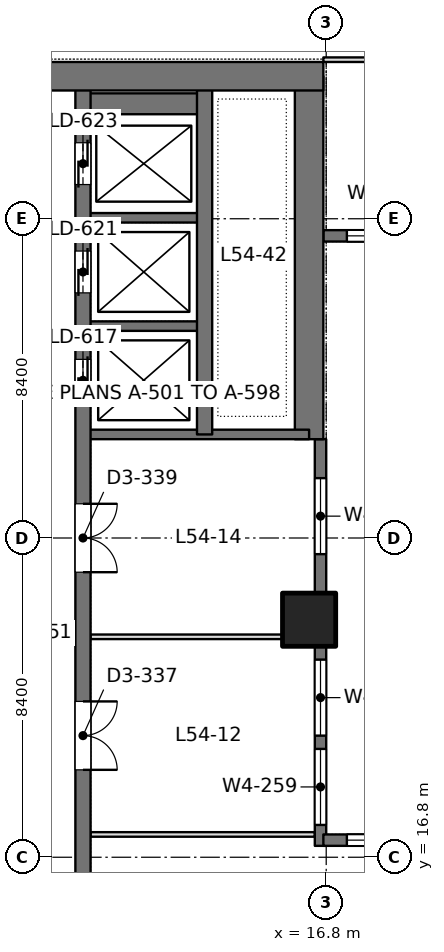
"""IFC4 building model, lengths in metres.
Left out: names, types, materials, properties, quantities, classifications, styles, units other than length and angle.
Written with IfcOpenShell. Run it as: python <this file> out.ifc"""

import sys

from ifc_helpers import new_model, si_unit, direction, frame, frame_2d, origin, origin_2d, place, context, subcontext, project, spatial, rectangle, extrude, element, fill, save


model = new_model("IFC4")
c1 = context("Model", 3, precision=1e-05, world=origin(), true_north=direction((0.0, 1.0)))
c2 = subcontext(c1, "Body", "Model", "MODEL_VIEW")
j1 = project(units=[si_unit("LENGTHUNIT", "METRE"), si_unit("PLANEANGLEUNIT", "RADIAN")], contexts=[c1])
p1 = place(None, origin())
s1 = spatial("IfcSite", under=j1, at=p1, CompositionType="ELEMENT")
p2 = place(p1, origin())
s2 = spatial("IfcBuilding", under=s1, at=p2, CompositionType="ELEMENT")
p3 = place(p2, frame((0.0, 0.0, 236.4)))
s3 = spatial("IfcBuildingStorey", under=s2, at=p3, CompositionType="ELEMENT", Elevation=236.4)
p4 = place(p3, frame((16.35, 23.05, 0.0), z_axis=(0.0, 0.0, 1.0), x_axis=(1.0, 0.0, 0.0)))
e1 = element("IfcColumn", 1, at=p4, inside=s3, PredefinedType="COLUMN", context=c2, shape_type="SweptSolid", body=[
    extrude(rectangle(XDim=1.4, YDim=1.4, at=origin_2d()), origin(), (0.0, 0.0, 1.0), 4.2),
])
p5 = place(p3, frame((-1.125, 37.35, 0.0), z_axis=(0.0, 0.0, 1.0), x_axis=(1.0, 0.0, 0.0)))
e2 = element("IfcWall", 2, at=p5, inside=s3, PredefinedType="SHEAR", context=c2, shape_type="SweptSolid", body=[
    extrude(rectangle(XDim=17.85, YDim=0.75, at=frame_2d((8.925, 0.0))), origin(), (0.0, 0.0, 1.0), 4.2),
])
p6 = place(p5, frame((8.875, 0.0, 0.0)))
e3 = element("IfcOpeningElement", 3, at=p6, cuts=e2, PredefinedType="OPENING", context=c2, shape_type="SweptSolid", body=[
    extrude(rectangle(XDim=1.8, YDim=2.4, at=frame_2d((0.9, 1.2))), frame((0.0, 0.385, 0.0), z_axis=(0.0, -1.0, 0.0), x_axis=(1.0, 0.0, 0.0)), (0.0, 0.0, 1.0), 0.77),
])
p7 = place(p3, frame((16.35, 27.8, 0.0), z_axis=(0.0, 0.0, 1.0), x_axis=(0.0, 1.0, 0.0)))
e4 = element("IfcWall", 4, at=p7, inside=s3, PredefinedType="SHEAR", context=c2, shape_type="SweptSolid", body=[
    extrude(rectangle(XDim=9.55, YDim=0.75, at=frame_2d((4.775, 0.0))), origin(), (0.0, 0.0, 1.0), 4.2),
])
p8 = place(p3, frame((10.4, 13.05, 0.0), z_axis=(0.0, 0.0, 1.0), x_axis=(0.0, 1.0, 0.0)))
e5 = element("IfcWall", 5, at=p8, inside=s3, PredefinedType="SHEAR", context=c2, shape_type="SweptSolid", body=[
    extrude(rectangle(XDim=24.3, YDim=0.4, at=frame_2d((12.15, 0.0))), origin(), (0.0, 0.0, 1.0), 4.2),
])
p9 = place(p8, frame((15.75, 0.0, 0.0)))
e6 = element("IfcOpeningElement", 6, at=p9, cuts=e5, PredefinedType="OPENING", context=c2, shape_type="SweptSolid", body=[
    extrude(rectangle(XDim=1.1, YDim=2.2, at=frame_2d((0.55, 1.1))), frame((0.0, 0.21, 0.0), z_axis=(0.0, -1.0, 0.0), x_axis=(1.0, 0.0, 0.0)), (0.0, 0.0, 1.0), 0.42),
])
p10 = place(p8, frame((18.6, 0.0, 0.0)))
e7 = element("IfcOpeningElement", 7, at=p10, cuts=e5, PredefinedType="OPENING", context=c2, shape_type="SweptSolid", body=[
    extrude(rectangle(XDim=1.1, YDim=2.2, at=frame_2d((0.55, 1.1))), frame((0.0, 0.21, 0.0), z_axis=(0.0, -1.0, 0.0), x_axis=(1.0, 0.0, 0.0)), (0.0, 0.0, 1.0), 0.42),
])
p11 = place(p8, frame((21.45, 0.0, 0.0)))
e8 = element("IfcOpeningElement", 8, at=p11, cuts=e5, PredefinedType="OPENING", context=c2, shape_type="SweptSolid", body=[
    extrude(rectangle(XDim=1.1, YDim=2.2, at=frame_2d((0.55, 1.1))), frame((0.0, 0.21, 0.0), z_axis=(0.0, -1.0, 0.0), x_axis=(1.0, 0.0, 0.0)), (0.0, 0.0, 1.0), 0.42),
])
p12 = place(p8, frame((6.05, 0.0, 0.0)))
e9 = element("IfcOpeningElement", 9, at=p12, cuts=e5, PredefinedType="OPENING", context=c2, shape_type="SweptSolid", body=[
    extrude(rectangle(XDim=1.8, YDim=2.4, at=frame_2d((0.9, 1.2))), frame((0.0, 0.21, 0.0), z_axis=(0.0, -1.0, 0.0), x_axis=(1.0, 0.0, 0.0)), (0.0, 0.0, 1.0), 0.42),
])
p13 = place(p8, frame((11.25, 0.0, 0.0)))
e10 = element("IfcOpeningElement", 10, at=p13, cuts=e5, PredefinedType="OPENING", context=c2, shape_type="SweptSolid", body=[
    extrude(rectangle(XDim=1.8, YDim=2.4, at=frame_2d((0.9, 1.2))), frame((0.0, 0.21, 0.0), z_axis=(0.0, -1.0, 0.0), x_axis=(1.0, 0.0, 0.0)), (0.0, 0.0, 1.0), 0.42),
])
p14 = place(p3, frame((13.6, 27.925, 0.0), z_axis=(0.0, 0.0, 1.0), x_axis=(0.0, 1.0, 0.0)))
e11 = element("IfcWall", 11, at=p14, inside=s3, PredefinedType="SHEAR", context=c2, shape_type="SweptSolid", body=[
    extrude(rectangle(XDim=9.425, YDim=0.4, at=frame_2d((4.712, 0.0))), origin(), (0.0, 0.0, 1.0), 4.2),
])
p15 = place(p3, frame((10.4, 27.925, 0.0), z_axis=(0.0, 0.0, 1.0), x_axis=(1.0, 0.0, 0.0)))
e12 = element("IfcWall", 12, at=p15, inside=s3, PredefinedType="SHEAR", context=c2, shape_type="SweptSolid", body=[
    extrude(rectangle(XDim=5.95, YDim=0.25, at=frame_2d((2.975, 0.0))), origin(), (0.0, 0.0, 1.0), 4.2),
])
for number, where, z_axis, x_axis in (
    (13, (10.4, 30.775, 0.0), (0.0, 0.0, 1.0), (1.0, 0.0, 0.0)),
    (14, (10.4, 33.625, 0.0), (0.0, 0.0, 1.0), (1.0, 0.0, 0.0)),
):
    element("IfcWall", number, at=place(p3, frame(where, z_axis=z_axis, x_axis=x_axis)), inside=s3, PredefinedType="SHEAR", context=c2, shape_type="SweptSolid", body=[
        extrude(rectangle(XDim=3.2, YDim=0.25, at=frame_2d((1.6, 0.0))), origin(), (0.0, 0.0, 1.0), 4.2),
    ])
p16 = place(p3, frame((10.4, 36.625, 0.0), z_axis=(0.0, 0.0, 1.0), x_axis=(1.0, 0.0, 0.0)))
e15 = element("IfcWall", 15, at=p16, inside=s3, PredefinedType="SHEAR", context=c2, shape_type="SweptSolid", body=[
    extrude(rectangle(XDim=3.2, YDim=0.55, at=frame_2d((1.6, 0.0))), origin(), (0.0, 0.0, 1.0), 4.2),
])
p17 = place(p3, frame((16.65, 17.1, 0.0), z_axis=(0.0, 0.0, 1.0), x_axis=(0.0, 1.0, 0.0)))
e16 = element("IfcWall", 16, at=p17, inside=s3, PredefinedType="SOLIDWALL", context=c2, shape_type="SweptSolid", body=[
    extrude(rectangle(XDim=10.7, YDim=0.3, at=frame_2d((5.35, 0.0))), origin(), (0.0, 0.0, 1.0), 4.05),
])
p18 = place(p17, frame((0.55, 0.0, 0.9)))
e17 = element("IfcOpeningElement", 17, at=p18, cuts=e16, PredefinedType="OPENING", context=c2, shape_type="SweptSolid", body=[
    extrude(rectangle(XDim=2.0, YDim=1.9, at=frame_2d((1.0, 0.95))), frame((0.0, 0.16, 0.0), z_axis=(0.0, -1.0, 0.0), x_axis=(1.0, 0.0, 0.0)), (0.0, 0.0, 1.0), 0.32),
])
p19 = place(p17, frame((2.9, 0.0, 0.9)))
e18 = element("IfcOpeningElement", 18, at=p19, cuts=e16, PredefinedType="OPENING", context=c2, shape_type="SweptSolid", body=[
    extrude(rectangle(XDim=2.0, YDim=1.9, at=frame_2d((1.0, 0.95))), frame((0.0, 0.16, 0.0), z_axis=(0.0, -1.0, 0.0), x_axis=(1.0, 0.0, 0.0)), (0.0, 0.0, 1.0), 0.32),
])
p20 = place(p17, frame((7.675, 0.0, 0.9)))
e19 = element("IfcOpeningElement", 19, at=p20, cuts=e16, PredefinedType="OPENING", context=c2, shape_type="SweptSolid", body=[
    extrude(rectangle(XDim=2.0, YDim=1.9, at=frame_2d((1.0, 0.95))), frame((0.0, 0.16, 0.0), z_axis=(0.0, -1.0, 0.0), x_axis=(1.0, 0.0, 0.0)), (0.0, 0.0, 1.0), 0.32),
])
p21 = place(p3, frame((16.725, 17.25, 0.0), z_axis=(0.0, 0.0, 1.0), x_axis=(1.0, 0.0, 0.0)))
e20 = element("IfcWall", 20, at=p21, inside=s3, PredefinedType="SOLIDWALL", context=c2, shape_type="SweptSolid", body=[
    extrude(rectangle(XDim=7.925, YDim=0.3, at=frame_2d((3.962, 0.0))), origin(), (0.0, 0.0, 1.0), 4.05),
])
p22 = place(p21, frame((0.619, 0.0, 0.9)))
e21 = element("IfcOpeningElement", 21, at=p22, cuts=e20, PredefinedType="OPENING", context=c2, shape_type="SweptSolid", body=[
    extrude(rectangle(XDim=2.0, YDim=1.9, at=frame_2d((1.0, 0.95))), frame((0.0, 0.16, 0.0), z_axis=(0.0, -1.0, 0.0), x_axis=(1.0, 0.0, 0.0)), (0.0, 0.0, 1.0), 0.32),
])
p23 = place(p21, frame((3.238, 0.0, 0.9)))
e22 = element("IfcOpeningElement", 22, at=p23, cuts=e20, PredefinedType="OPENING", context=c2, shape_type="SweptSolid", body=[
    extrude(rectangle(XDim=2.0, YDim=1.9, at=frame_2d((1.0, 0.95))), frame((0.0, 0.16, 0.0), z_axis=(0.0, -1.0, 0.0), x_axis=(1.0, 0.0, 0.0)), (0.0, 0.0, 1.0), 0.32),
])
p24 = place(p21, frame((5.856, 0.0, 0.9)))
e23 = element("IfcOpeningElement", 23, at=p24, cuts=e20, PredefinedType="OPENING", context=c2, shape_type="SweptSolid", body=[
    extrude(rectangle(XDim=2.0, YDim=1.9, at=frame_2d((1.0, 0.95))), frame((0.0, 0.16, 0.0), z_axis=(0.0, -1.0, 0.0), x_axis=(1.0, 0.0, 0.0)), (0.0, 0.0, 1.0), 0.32),
])
p25 = place(p3, frame((16.725, 33.15, 0.0), z_axis=(0.0, 0.0, 1.0), x_axis=(1.0, 0.0, 0.0)))
e24 = element("IfcWall", 24, at=p25, inside=s3, PredefinedType="SOLIDWALL", context=c2, shape_type="SweptSolid", body=[
    extrude(rectangle(XDim=7.925, YDim=0.3, at=frame_2d((3.962, 0.0))), origin(), (0.0, 0.0, 1.0), 4.05),
])
p26 = place(p25, frame((0.619, 0.0, 0.9)))
e25 = element("IfcOpeningElement", 25, at=p26, cuts=e24, PredefinedType="OPENING", context=c2, shape_type="SweptSolid", body=[
    extrude(rectangle(XDim=2.0, YDim=1.9, at=frame_2d((1.0, 0.95))), frame((0.0, 0.16, 0.0), z_axis=(0.0, -1.0, 0.0), x_axis=(1.0, 0.0, 0.0)), (0.0, 0.0, 1.0), 0.32),
])
p27 = place(p25, frame((3.238, 0.0, 0.9)))
e26 = element("IfcOpeningElement", 26, at=p27, cuts=e24, PredefinedType="OPENING", context=c2, shape_type="SweptSolid", body=[
    extrude(rectangle(XDim=2.0, YDim=1.9, at=frame_2d((1.0, 0.95))), frame((0.0, 0.16, 0.0), z_axis=(0.0, -1.0, 0.0), x_axis=(1.0, 0.0, 0.0)), (0.0, 0.0, 1.0), 0.32),
])
p28 = place(p25, frame((5.856, 0.0, 0.9)))
e27 = element("IfcOpeningElement", 27, at=p28, cuts=e24, PredefinedType="OPENING", context=c2, shape_type="SweptSolid", body=[
    extrude(rectangle(XDim=2.0, YDim=1.9, at=frame_2d((1.0, 0.95))), frame((0.0, 0.16, 0.0), z_axis=(0.0, -1.0, 0.0), x_axis=(1.0, 0.0, 0.0)), (0.0, 0.0, 1.0), 0.32),
])
p29 = place(p3, frame((10.598, 17.4, 0.0), z_axis=(0.0, 0.0, 1.0), x_axis=(1.0, 0.0, 0.0)))
e28 = element("IfcWall", 28, at=p29, inside=s3, PredefinedType="PARTITIONING", context=c2, shape_type="SweptSolid", body=[
    extrude(rectangle(XDim=5.904, YDim=0.12, at=frame_2d((2.952, 0.0))), origin(), (0.0, 0.0, 1.0), 3.55),
])
p30 = place(p3, frame((10.598, 22.6, 0.0), z_axis=(0.0, 0.0, 1.0), x_axis=(1.0, 0.0, 0.0)))
e29 = element("IfcWall", 29, at=p30, inside=s3, PredefinedType="PARTITIONING", context=c2, shape_type="SweptSolid", body=[
    extrude(rectangle(XDim=5.053, YDim=0.12, at=frame_2d((2.526, 0.0))), origin(), (0.0, 0.0, 1.0), 4.05),
])
p31 = place(p3, frame((16.725, 37.785, 0.0), z_axis=(0.0, 0.0, 1.0), x_axis=(1.0, 0.0, 0.0)))
e30 = element("IfcWall", 30, at=p31, inside=s3, PredefinedType="PARTITIONING", context=c2, shape_type="SweptSolid", body=[
    extrude(rectangle(XDim=16.95, YDim=0.12, at=frame_2d((8.475, 0.0))), origin(), (0.0, 0.0, 1.0), 3.55),
])
p32 = place(p31, frame((7.575, 0.0, 0.0)))
e31 = element("IfcOpeningElement", 31, at=p32, cuts=e30, PredefinedType="OPENING", context=c2, shape_type="SweptSolid", body=[
    extrude(rectangle(XDim=1.8, YDim=2.2, at=frame_2d((0.9, 1.1))), frame((0.0, 0.07, 0.0), z_axis=(0.0, -1.0, 0.0), x_axis=(1.0, 0.0, 0.0)), (0.0, 0.0, 1.0), 0.14),
])
p33 = place(p18, origin())
e32 = element("IfcWindow", 32, at=p33, inside=s3, PartitioningType="SINGLE_PANEL", PredefinedType="WINDOW", context=c2, shape_type="SweptSolid", body=[
    extrude(rectangle(XDim=2.0, YDim=1.9, at=frame_2d((1.0, 0.95))), frame((0.0, 0.03, 0.0), z_axis=(0.0, -1.0, 0.0), x_axis=(1.0, 0.0, 0.0)), (0.0, 0.0, 1.0), 0.06),
])
fill(e17, e32)
p34 = place(p19, origin())
e33 = element("IfcWindow", 33, at=p34, inside=s3, PartitioningType="SINGLE_PANEL", PredefinedType="WINDOW", context=c2, shape_type="SweptSolid", body=[
    extrude(rectangle(XDim=2.0, YDim=1.9, at=frame_2d((1.0, 0.95))), frame((0.0, 0.03, 0.0), z_axis=(0.0, -1.0, 0.0), x_axis=(1.0, 0.0, 0.0)), (0.0, 0.0, 1.0), 0.06),
])
fill(e18, e33)
p35 = place(p20, origin())
e34 = element("IfcWindow", 34, at=p35, inside=s3, PartitioningType="SINGLE_PANEL", PredefinedType="WINDOW", context=c2, shape_type="SweptSolid", body=[
    extrude(rectangle(XDim=2.0, YDim=1.9, at=frame_2d((1.0, 0.95))), frame((0.0, 0.03, 0.0), z_axis=(0.0, -1.0, 0.0), x_axis=(1.0, 0.0, 0.0)), (0.0, 0.0, 1.0), 0.06),
])
fill(e19, e34)
p36 = place(p22, origin())
e35 = element("IfcWindow", 35, at=p36, inside=s3, PartitioningType="SINGLE_PANEL", PredefinedType="WINDOW", context=c2, shape_type="SweptSolid", body=[
    extrude(rectangle(XDim=2.0, YDim=1.9, at=frame_2d((1.0, 0.95))), frame((0.0, 0.03, 0.0), z_axis=(0.0, -1.0, 0.0), x_axis=(1.0, 0.0, 0.0)), (0.0, 0.0, 1.0), 0.06),
])
fill(e21, e35)
p37 = place(p26, origin())
e36 = element("IfcWindow", 36, at=p37, inside=s3, PartitioningType="SINGLE_PANEL", PredefinedType="WINDOW", context=c2, shape_type="SweptSolid", body=[
    extrude(rectangle(XDim=2.0, YDim=1.9, at=frame_2d((1.0, 0.95))), frame((0.0, 0.03, 0.0), z_axis=(0.0, -1.0, 0.0), x_axis=(1.0, 0.0, 0.0)), (0.0, 0.0, 1.0), 0.06),
])
fill(e25, e36)
p38 = place(p9, origin())
e37 = element("IfcDoor", 37, at=p38, inside=s3, OperationType="DOUBLE_DOOR_SLIDING", PredefinedType="DOOR", context=c2, shape_type="SweptSolid", body=[
    extrude(rectangle(XDim=1.1, YDim=2.2, at=frame_2d((0.55, 1.1))), frame((0.0, 0.025, 0.0), z_axis=(0.0, -1.0, 0.0), x_axis=(1.0, 0.0, 0.0)), (0.0, 0.0, 1.0), 0.05),
])
fill(e6, e37)
p39 = place(p10, origin())
e38 = element("IfcDoor", 38, at=p39, inside=s3, OperationType="DOUBLE_DOOR_SLIDING", PredefinedType="DOOR", context=c2, shape_type="SweptSolid", body=[
    extrude(rectangle(XDim=1.1, YDim=2.2, at=frame_2d((0.55, 1.1))), frame((0.0, 0.025, 0.0), z_axis=(0.0, -1.0, 0.0), x_axis=(1.0, 0.0, 0.0)), (0.0, 0.0, 1.0), 0.05),
])
fill(e7, e38)
p40 = place(p11, origin())
e39 = element("IfcDoor", 39, at=p40, inside=s3, OperationType="DOUBLE_DOOR_SLIDING", PredefinedType="DOOR", context=c2, shape_type="SweptSolid", body=[
    extrude(rectangle(XDim=1.1, YDim=2.2, at=frame_2d((0.55, 1.1))), frame((0.0, 0.025, 0.0), z_axis=(0.0, -1.0, 0.0), x_axis=(1.0, 0.0, 0.0)), (0.0, 0.0, 1.0), 0.05),
])
fill(e8, e39)
p41 = place(p12, frame((1.8, 0.0, 0.0), z_axis=(0.0, 0.0, 1.0), x_axis=(-1.0, 0.0, 0.0)))
e40 = element("IfcDoor", 40, at=p41, inside=s3, OperationType="DOUBLE_DOOR_SINGLE_SWING", PredefinedType="DOOR", context=c2, shape_type="SweptSolid", body=[
    extrude(rectangle(XDim=1.8, YDim=2.4, at=frame_2d((0.9, 1.2))), frame((0.0, 0.025, 0.0), z_axis=(0.0, -1.0, 0.0), x_axis=(1.0, 0.0, 0.0)), (0.0, 0.0, 1.0), 0.05),
])
fill(e9, e40)
p42 = place(p13, frame((1.8, 0.0, 0.0), z_axis=(0.0, 0.0, 1.0), x_axis=(-1.0, 0.0, 0.0)))
e41 = element("IfcDoor", 41, at=p42, inside=s3, OperationType="DOUBLE_DOOR_SINGLE_SWING", PredefinedType="DOOR", context=c2, shape_type="SweptSolid", body=[
    extrude(rectangle(XDim=1.8, YDim=2.4, at=frame_2d((0.9, 1.2))), frame((0.0, 0.025, 0.0), z_axis=(0.0, -1.0, 0.0), x_axis=(1.0, 0.0, 0.0)), (0.0, 0.0, 1.0), 0.05),
])
fill(e10, e41)
save(model, sys.argv[1])
